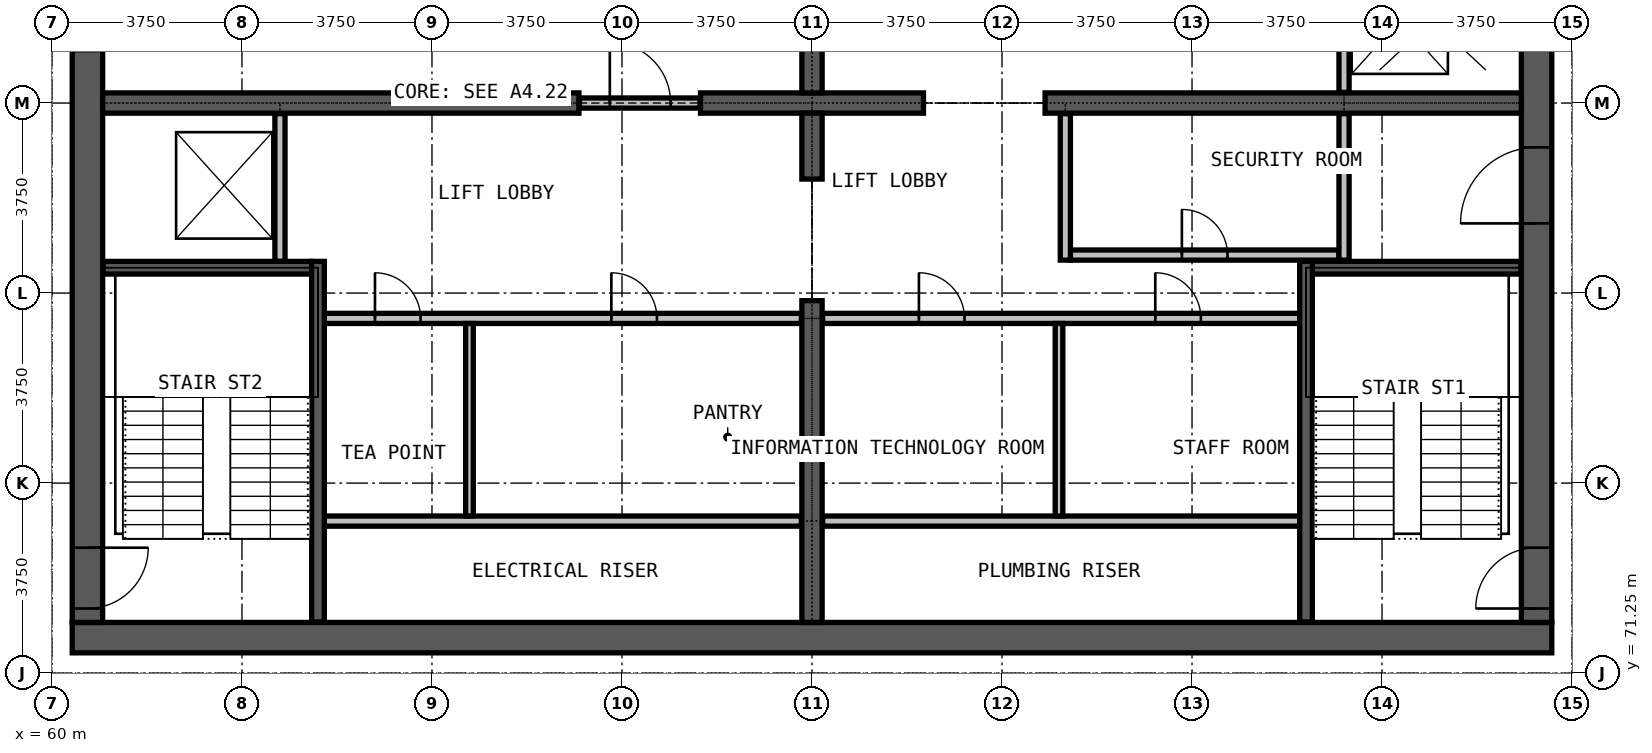
"""IFC4 building model, lengths in metres.
Left out: names, types, materials, properties, quantities, classifications, styles, units other than length and angle.
Written with IfcOpenShell. Run it as: python <this file> out.ifc"""

import sys

from ifc_helpers import new_model, si_unit, direction, frame, frame_2d, origin, place, context, subcontext, project, spatial, rectangle, extrude, element, fill, save


model = new_model("IFC4")
c1 = context("Model", 3, precision=1e-05, world=origin(), true_north=direction((0.0, 1.0)))
c2 = subcontext(c1, "Body", "Model", "MODEL_VIEW")
j1 = project(units=[si_unit("LENGTHUNIT", "METRE"), si_unit("PLANEANGLEUNIT", "RADIAN")], contexts=[c1])
p1 = place(None, origin())
s1 = spatial("IfcSite", under=j1, at=p1, CompositionType="ELEMENT")
p2 = place(p1, origin())
s2 = spatial("IfcBuilding", under=s1, at=p2, CompositionType="ELEMENT")
p3 = place(p2, frame((0.0, 0.0, 210.3)))
s3 = spatial("IfcBuildingStorey", under=s2, at=p3, CompositionType="ELEMENT", Elevation=210.3)
p4 = place(p3, frame((60.4, 71.95, 0.0), z_axis=(0.0, 0.0, 1.0), x_axis=(1.0, 0.0, 0.0)))
e1 = element("IfcWall", 1, at=p4, inside=s3, PredefinedType="SHEAR", context=c2, shape_type="SweptSolid", body=[
    extrude(rectangle(XDim=29.2, YDim=0.6, at=frame_2d((14.6, 0.0))), origin(), (0.0, 0.0, 1.0), 3.6),
])
p5 = place(p3, frame((89.3, 72.25, 0.0), z_axis=(0.0, 0.0, 1.0), x_axis=(0.0, 1.0, 0.0)))
e2 = element("IfcWall", 2, at=p5, inside=s3, PredefinedType="SHEAR", context=c2, shape_type="SweptSolid", body=[
    extrude(rectangle(XDim=20.5, YDim=0.6, at=frame_2d((10.25, 0.0))), origin(), (0.0, 0.0, 1.0), 3.6),
])
p6 = place(p5, frame((0.275, 0.0, 0.0)))
e3 = element("IfcOpeningElement", 3, at=p6, cuts=e2, PredefinedType="OPENING", context=c2, shape_type="SweptSolid", body=[
    extrude(rectangle(XDim=1.2, YDim=2.2, at=frame_2d((0.6, 1.1))), frame((0.0, 0.31, 0.0), z_axis=(0.0, -1.0, 0.0), x_axis=(1.0, 0.0, 0.0)), (0.0, 0.0, 1.0), 0.62),
])
p7 = place(p5, frame((13.775, 0.0, 0.0)))
e4 = element("IfcOpeningElement", 4, at=p7, cuts=e2, PredefinedType="OPENING", context=c2, shape_type="SweptSolid", body=[
    extrude(rectangle(XDim=1.2, YDim=2.2, at=frame_2d((0.6, 1.1))), frame((0.0, 0.31, 0.0), z_axis=(0.0, -1.0, 0.0), x_axis=(1.0, 0.0, 0.0)), (0.0, 0.0, 1.0), 0.62),
])
p8 = place(p5, frame((7.875, 0.0, 0.0)))
e5 = element("IfcOpeningElement", 5, at=p8, cuts=e2, PredefinedType="OPENING", context=c2, shape_type="SweptSolid", body=[
    extrude(rectangle(XDim=1.5, YDim=2.2, at=frame_2d((0.75, 1.1))), frame((0.0, 0.31, 0.0), z_axis=(0.0, -1.0, 0.0), x_axis=(1.0, 0.0, 0.0)), (0.0, 0.0, 1.0), 0.62),
])
p9 = place(p3, frame((60.7, 92.75, 0.0), z_axis=(0.0, 0.0, 1.0), x_axis=(0.0, -1.0, 0.0)))
e6 = element("IfcWall", 6, at=p9, inside=s3, PredefinedType="SHEAR", context=c2, shape_type="SweptSolid", body=[
    extrude(rectangle(XDim=20.5, YDim=0.6, at=frame_2d((10.25, 0.0))), origin(), (0.0, 0.0, 1.0), 3.6),
])
p10 = place(p9, frame((19.025, 0.0, 0.0)))
e7 = element("IfcOpeningElement", 7, at=p10, cuts=e6, PredefinedType="OPENING", context=c2, shape_type="SweptSolid", body=[
    extrude(rectangle(XDim=1.2, YDim=2.2, at=frame_2d((0.6, 1.1))), frame((0.0, 0.31, 0.0), z_axis=(0.0, -1.0, 0.0), x_axis=(1.0, 0.0, 0.0)), (0.0, 0.0, 1.0), 0.62),
])
p11 = place(p9, frame((8.025, 0.0, 0.0)))
e8 = element("IfcOpeningElement", 8, at=p11, cuts=e6, PredefinedType="OPENING", context=c2, shape_type="SweptSolid", body=[
    extrude(rectangle(XDim=1.2, YDim=2.2, at=frame_2d((0.6, 1.1))), frame((0.0, 0.31, 0.0), z_axis=(0.0, -1.0, 0.0), x_axis=(1.0, 0.0, 0.0)), (0.0, 0.0, 1.0), 0.62),
])
p12 = place(p3, frame((61.0, 82.5, 0.0), z_axis=(0.0, 0.0, 1.0), x_axis=(1.0, 0.0, 0.0)))
e9 = element("IfcWall", 9, at=p12, inside=s3, PredefinedType="SHEAR", context=c2, shape_type="SweptSolid", body=[
    extrude(rectangle(XDim=9.4, YDim=0.4, at=frame_2d((4.7, 0.0))), origin(), (0.0, 0.0, 1.0), 3.6),
])
p13 = place(p3, frame((72.8, 82.5, 0.0), z_axis=(0.0, 0.0, 1.0), x_axis=(1.0, 0.0, 0.0)))
e10 = element("IfcWall", 10, at=p13, inside=s3, PredefinedType="SHEAR", context=c2, shape_type="SweptSolid", body=[
    extrude(rectangle(XDim=4.4, YDim=0.4, at=frame_2d((2.2, 0.0))), origin(), (0.0, 0.0, 1.0), 3.6),
])
p14 = place(p3, frame((79.6, 82.5, 0.0), z_axis=(0.0, 0.0, 1.0), x_axis=(1.0, 0.0, 0.0)))
e11 = element("IfcWall", 11, at=p14, inside=s3, PredefinedType="SHEAR", context=c2, shape_type="SweptSolid", body=[
    extrude(rectangle(XDim=9.4, YDim=0.4, at=frame_2d((4.7, 0.0))), origin(), (0.0, 0.0, 1.0), 3.6),
])
p15 = place(p3, frame((75.0, 72.25, 0.0), z_axis=(0.0, 0.0, 1.0), x_axis=(0.0, 1.0, 0.0)))
e12 = element("IfcWall", 12, at=p15, inside=s3, PredefinedType="SHEAR", context=c2, shape_type="SweptSolid", body=[
    extrude(rectangle(XDim=6.35, YDim=0.4, at=frame_2d((3.175, 0.0))), origin(), (0.0, 0.0, 1.0), 3.6),
])
for number, where, z_axis, x_axis in (
    (13, (75.0, 81.0, 0.0), (0.0, 0.0, 1.0), (0.0, 1.0, 0.0)),
    (14, (75.0, 82.7, 0.0), (0.0, 0.0, 1.0), (0.0, 1.0, 0.0)),
):
    element("IfcWall", number, at=place(p3, frame(where, z_axis=z_axis, x_axis=x_axis)), inside=s3, PredefinedType="SHEAR", context=c2, shape_type="SweptSolid", body=[
        extrude(rectangle(XDim=1.3, YDim=0.4, at=frame_2d((0.65, 0.0))), origin(), (0.0, 0.0, 1.0), 3.6),
    ])
for number, where, z_axis, x_axis in (
    (15, (65.375, 74.25, 0.0), (0.0, 0.0, 1.0), (1.0, 0.0, 0.0)),
    (16, (75.21, 74.25, 0.0), (0.0, 0.0, 1.0), (1.0, 0.0, 0.0)),
):
    element("IfcWall", number, at=place(p3, frame(where, z_axis=z_axis, x_axis=x_axis)), inside=s3, PredefinedType="PARTITIONING", context=c2, shape_type="SweptSolid", body=[
        extrude(rectangle(XDim=9.415, YDim=0.2, at=frame_2d((4.708, 0.0))), origin(), (0.0, 0.0, 1.0), 3.3),
    ])
p16 = place(p3, frame((65.375, 78.25, 0.0), z_axis=(0.0, 0.0, 1.0), x_axis=(1.0, 0.0, 0.0)))
e17 = element("IfcWall", 17, at=p16, inside=s3, PredefinedType="PARTITIONING", context=c2, shape_type="SweptSolid", body=[
    extrude(rectangle(XDim=9.415, YDim=0.2, at=frame_2d((4.708, 0.0))), origin(), (0.0, 0.0, 1.0), 3.3),
])
p17 = place(p16, frame((1.0, 0.0, 0.0)))
e18 = element("IfcOpeningElement", 18, at=p17, cuts=e17, PredefinedType="OPENING", context=c2, shape_type="SweptSolid", body=[
    extrude(rectangle(XDim=0.9, YDim=2.2, at=frame_2d((0.45, 1.1))), frame((0.0, 0.11, 0.0), z_axis=(0.0, -1.0, 0.0), x_axis=(1.0, 0.0, 0.0)), (0.0, 0.0, 1.0), 0.22),
])
p18 = place(p16, frame((5.665, 0.0, 0.0)))
e19 = element("IfcOpeningElement", 19, at=p18, cuts=e17, PredefinedType="OPENING", context=c2, shape_type="SweptSolid", body=[
    extrude(rectangle(XDim=0.9, YDim=2.2, at=frame_2d((0.45, 1.1))), frame((0.0, 0.11, 0.0), z_axis=(0.0, -1.0, 0.0), x_axis=(1.0, 0.0, 0.0)), (0.0, 0.0, 1.0), 0.22),
])
p19 = place(p3, frame((75.21, 78.25, 0.0), z_axis=(0.0, 0.0, 1.0), x_axis=(1.0, 0.0, 0.0)))
e20 = element("IfcWall", 20, at=p19, inside=s3, PredefinedType="PARTITIONING", context=c2, shape_type="SweptSolid", body=[
    extrude(rectangle(XDim=9.415, YDim=0.2, at=frame_2d((4.708, 0.0))), origin(), (0.0, 0.0, 1.0), 3.3),
])
p20 = place(p19, frame((1.9, 0.0, 0.0)))
e21 = element("IfcOpeningElement", 21, at=p20, cuts=e20, PredefinedType="OPENING", context=c2, shape_type="SweptSolid", body=[
    extrude(rectangle(XDim=0.9, YDim=2.2, at=frame_2d((0.45, 1.1))), frame((0.0, 0.11, 0.0), z_axis=(0.0, -1.0, 0.0), x_axis=(1.0, 0.0, 0.0)), (0.0, 0.0, 1.0), 0.22),
])
p21 = place(p19, frame((6.565, 0.0, 0.0)))
e22 = element("IfcOpeningElement", 22, at=p21, cuts=e20, PredefinedType="OPENING", context=c2, shape_type="SweptSolid", body=[
    extrude(rectangle(XDim=0.9, YDim=2.2, at=frame_2d((0.45, 1.1))), frame((0.0, 0.11, 0.0), z_axis=(0.0, -1.0, 0.0), x_axis=(1.0, 0.0, 0.0)), (0.0, 0.0, 1.0), 0.22),
])
p22 = place(p3, frame((80.1, 79.5, 0.0), z_axis=(0.0, 0.0, 1.0), x_axis=(1.0, 0.0, 0.0)))
e23 = element("IfcWall", 23, at=p22, inside=s3, PredefinedType="PARTITIONING", context=c2, shape_type="SweptSolid", body=[
    extrude(rectangle(XDim=5.3, YDim=0.2, at=frame_2d((2.65, 0.0))), origin(), (0.0, 0.0, 1.0), 3.3),
])
p23 = place(p22, frame((2.2, 0.0, 0.0)))
e24 = element("IfcOpeningElement", 24, at=p23, cuts=e23, PredefinedType="OPENING", context=c2, shape_type="SweptSolid", body=[
    extrude(rectangle(XDim=0.9, YDim=2.2, at=frame_2d((0.45, 1.1))), frame((0.0, 0.11, 0.0), z_axis=(0.0, -1.0, 0.0), x_axis=(1.0, 0.0, 0.0)), (0.0, 0.0, 1.0), 0.22),
])
p24 = place(p3, frame((70.41, 82.5, 0.0), z_axis=(0.0, 0.0, 1.0), x_axis=(1.0, 0.0, 0.0)))
e25 = element("IfcWall", 25, at=p24, inside=s3, PredefinedType="PARTITIONING", context=c2, shape_type="SweptSolid", body=[
    extrude(rectangle(XDim=2.38, YDim=0.2, at=frame_2d((1.19, 0.0))), origin(), (0.0, 0.0, 1.0), 2.4),
])
p25 = place(p24, frame((0.6, 0.0, 0.0)))
e26 = element("IfcOpeningElement", 26, at=p25, cuts=e25, PredefinedType="OPENING", context=c2, shape_type="SweptSolid", body=[
    extrude(rectangle(XDim=1.2, YDim=2.2, at=frame_2d((0.6, 1.1))), frame((0.0, 0.11, 0.0), z_axis=(0.0, -1.0, 0.0), x_axis=(1.0, 0.0, 0.0)), (0.0, 0.0, 1.0), 0.22),
])
for number, where, z_axis, x_axis in (
    (27, (80.0, 79.4, 0.0), (0.0, 0.0, 1.0), (0.0, 1.0, 0.0)),
    (28, (85.5, 79.4, 0.0), (0.0, 0.0, 1.0), (0.0, 1.0, 0.0)),
):
    element("IfcWall", number, at=place(p3, frame(where, z_axis=z_axis, x_axis=x_axis)), inside=s3, PredefinedType="PARTITIONING", context=c2, shape_type="SweptSolid", body=[
        extrude(rectangle(XDim=2.89, YDim=0.2, at=frame_2d((1.445, 0.0))), origin(), (0.0, 0.0, 1.0), 3.3),
    ])
for number, where, z_axis, x_axis in (
    (29, (68.24, 74.35, 0.0), (0.0, 0.0, 1.0), (0.0, 1.0, 0.0)),
    (30, (79.875, 74.35, 0.0), (0.0, 0.0, 1.0), (0.0, 1.0, 0.0)),
):
    element("IfcWall", number, at=place(p3, frame(where, z_axis=z_axis, x_axis=x_axis)), inside=s3, PredefinedType="PARTITIONING", context=c2, shape_type="SweptSolid", body=[
        extrude(rectangle(XDim=3.8, YDim=0.15, at=frame_2d((1.9, 0.0))), origin(), (0.0, 0.0, 1.0), 3.3),
    ])
p26 = place(p3, frame((64.5, 79.375, 0.0), z_axis=(0.0, 0.0, 1.0), x_axis=(0.0, 1.0, 0.0)))
e31 = element("IfcWall", 31, at=p26, inside=s3, PredefinedType="PARTITIONING", context=c2, shape_type="SweptSolid", body=[
    extrude(rectangle(XDim=2.915, YDim=0.2, at=frame_2d((1.458, 0.0))), origin(), (0.0, 0.0, 1.0), 3.3),
])
p27 = place(p3, frame((85.5, 82.71, 0.0), z_axis=(0.0, 0.0, 1.0), x_axis=(0.0, 1.0, 0.0)))
e32 = element("IfcWall", 32, at=p27, inside=s3, PredefinedType="PARTITIONING", context=c2, shape_type="SweptSolid", body=[
    extrude(rectangle(XDim=2.915, YDim=0.2, at=frame_2d((1.458, 0.0))), origin(), (0.0, 0.0, 1.0), 3.3),
])
p28 = place(p27, frame((0.9, 0.0, 0.0)))
e33 = element("IfcOpeningElement", 33, at=p28, cuts=e32, PredefinedType="OPENING", context=c2, shape_type="SweptSolid", body=[
    extrude(rectangle(XDim=1.1, YDim=2.2, at=frame_2d((0.55, 1.1))), frame((0.0, 0.11, 0.0), z_axis=(0.0, -1.0, 0.0), x_axis=(1.0, 0.0, 0.0)), (0.0, 0.0, 1.0), 0.22),
])
for number, where, z_axis, x_axis in (
    (34, (61.01, 79.25, 0.0), (0.0, 0.0, 1.0), (1.0, 0.0, 0.0)),
    (35, (84.875, 79.25, 0.0), (0.0, 0.0, 1.0), (1.0, 0.0, 0.0)),
):
    element("IfcWall", number, at=place(p3, frame(where, z_axis=z_axis, x_axis=x_axis)), inside=s3, PredefinedType="PARTITIONING", context=c2, shape_type="SweptSolid", body=[
        extrude(rectangle(XDim=4.115, YDim=0.25, at=frame_2d((2.058, 0.0))), origin(), (0.0, 0.0, 1.0), 3.3),
    ])
for number, where, z_axis, x_axis in (
    (36, (65.25, 72.26, 0.0), (0.0, 0.0, 1.0), (0.0, 1.0, 0.0)),
    (37, (84.75, 72.26, 0.0), (0.0, 0.0, 1.0), (0.0, 1.0, 0.0)),
):
    element("IfcWall", number, at=place(p3, frame(where, z_axis=z_axis, x_axis=x_axis)), inside=s3, PredefinedType="PARTITIONING", context=c2, shape_type="SweptSolid", body=[
        extrude(rectangle(XDim=7.115, YDim=0.25, at=frame_2d((3.558, 0.0))), origin(), (0.0, 0.0, 1.0), 3.3),
    ])
p29 = place(p25, origin())
e38 = element("IfcDoor", 38, at=p29, inside=s3, OperationType="SINGLE_SWING_LEFT", PredefinedType="DOOR", context=c2, shape_type="SweptSolid", body=[
    extrude(rectangle(XDim=1.2, YDim=2.2, at=frame_2d((0.6, 1.1))), frame((0.0, 0.025, 0.0), z_axis=(0.0, -1.0, 0.0), x_axis=(1.0, 0.0, 0.0)), (0.0, 0.0, 1.0), 0.05),
])
fill(e26, e38)
p30 = place(p6, origin())
e39 = element("IfcDoor", 39, at=p30, inside=s3, OperationType="SINGLE_SWING_RIGHT", PredefinedType="DOOR", context=c2, shape_type="SweptSolid", body=[
    extrude(rectangle(XDim=1.2, YDim=2.2, at=frame_2d((0.6, 1.1))), frame((0.0, 0.025, 0.0), z_axis=(0.0, -1.0, 0.0), x_axis=(1.0, 0.0, 0.0)), (0.0, 0.0, 1.0), 0.05),
])
fill(e3, e39)
p31 = place(p10, origin())
e40 = element("IfcDoor", 40, at=p31, inside=s3, OperationType="SINGLE_SWING_LEFT", PredefinedType="DOOR", context=c2, shape_type="SweptSolid", body=[
    extrude(rectangle(XDim=1.2, YDim=2.2, at=frame_2d((0.6, 1.1))), frame((0.0, 0.025, 0.0), z_axis=(0.0, -1.0, 0.0), x_axis=(1.0, 0.0, 0.0)), (0.0, 0.0, 1.0), 0.05),
])
fill(e7, e40)
p32 = place(p8, origin())
e41 = element("IfcDoor", 41, at=p32, inside=s3, OperationType="DOUBLE_DOOR_SINGLE_SWING", PredefinedType="DOOR", context=c2, shape_type="SweptSolid", body=[
    extrude(rectangle(XDim=1.5, YDim=2.2, at=frame_2d((0.75, 1.1))), frame((0.0, 0.025, 0.0), z_axis=(0.0, -1.0, 0.0), x_axis=(1.0, 0.0, 0.0)), (0.0, 0.0, 1.0), 0.05),
])
fill(e5, e41)
p33 = place(p23, origin())
e42 = element("IfcDoor", 42, at=p33, inside=s3, OperationType="SINGLE_SWING_LEFT", PredefinedType="DOOR", context=c2, shape_type="SweptSolid", body=[
    extrude(rectangle(XDim=0.9, YDim=2.2, at=frame_2d((0.45, 1.1))), frame((0.0, 0.025, 0.0), z_axis=(0.0, -1.0, 0.0), x_axis=(1.0, 0.0, 0.0)), (0.0, 0.0, 1.0), 0.05),
])
fill(e24, e42)
p34 = place(p17, origin())
e43 = element("IfcDoor", 43, at=p34, inside=s3, OperationType="SINGLE_SWING_LEFT", PredefinedType="DOOR", context=c2, shape_type="SweptSolid", body=[
    extrude(rectangle(XDim=0.9, YDim=2.2, at=frame_2d((0.45, 1.1))), frame((0.0, 0.025, 0.0), z_axis=(0.0, -1.0, 0.0), x_axis=(1.0, 0.0, 0.0)), (0.0, 0.0, 1.0), 0.05),
])
fill(e18, e43)
p35 = place(p18, origin())
e44 = element("IfcDoor", 44, at=p35, inside=s3, OperationType="SINGLE_SWING_RIGHT", PredefinedType="DOOR", context=c2, shape_type="SweptSolid", body=[
    extrude(rectangle(XDim=0.9, YDim=2.2, at=frame_2d((0.45, 1.1))), frame((0.0, 0.025, 0.0), z_axis=(0.0, -1.0, 0.0), x_axis=(1.0, 0.0, 0.0)), (0.0, 0.0, 1.0), 0.05),
])
fill(e19, e44)
p36 = place(p20, origin())
e45 = element("IfcDoor", 45, at=p36, inside=s3, OperationType="SINGLE_SWING_RIGHT", PredefinedType="DOOR", context=c2, shape_type="SweptSolid", body=[
    extrude(rectangle(XDim=0.9, YDim=2.2, at=frame_2d((0.45, 1.1))), frame((0.0, 0.025, 0.0), z_axis=(0.0, -1.0, 0.0), x_axis=(1.0, 0.0, 0.0)), (0.0, 0.0, 1.0), 0.05),
])
fill(e21, e45)
p37 = place(p21, origin())
e46 = element("IfcDoor", 46, at=p37, inside=s3, OperationType="SINGLE_SWING_LEFT", PredefinedType="DOOR", context=c2, shape_type="SweptSolid", body=[
    extrude(rectangle(XDim=0.9, YDim=2.2, at=frame_2d((0.45, 1.1))), frame((0.0, 0.025, 0.0), z_axis=(0.0, -1.0, 0.0), x_axis=(1.0, 0.0, 0.0)), (0.0, 0.0, 1.0), 0.05),
])
fill(e22, e46)
save(model, sys.argv[1])
